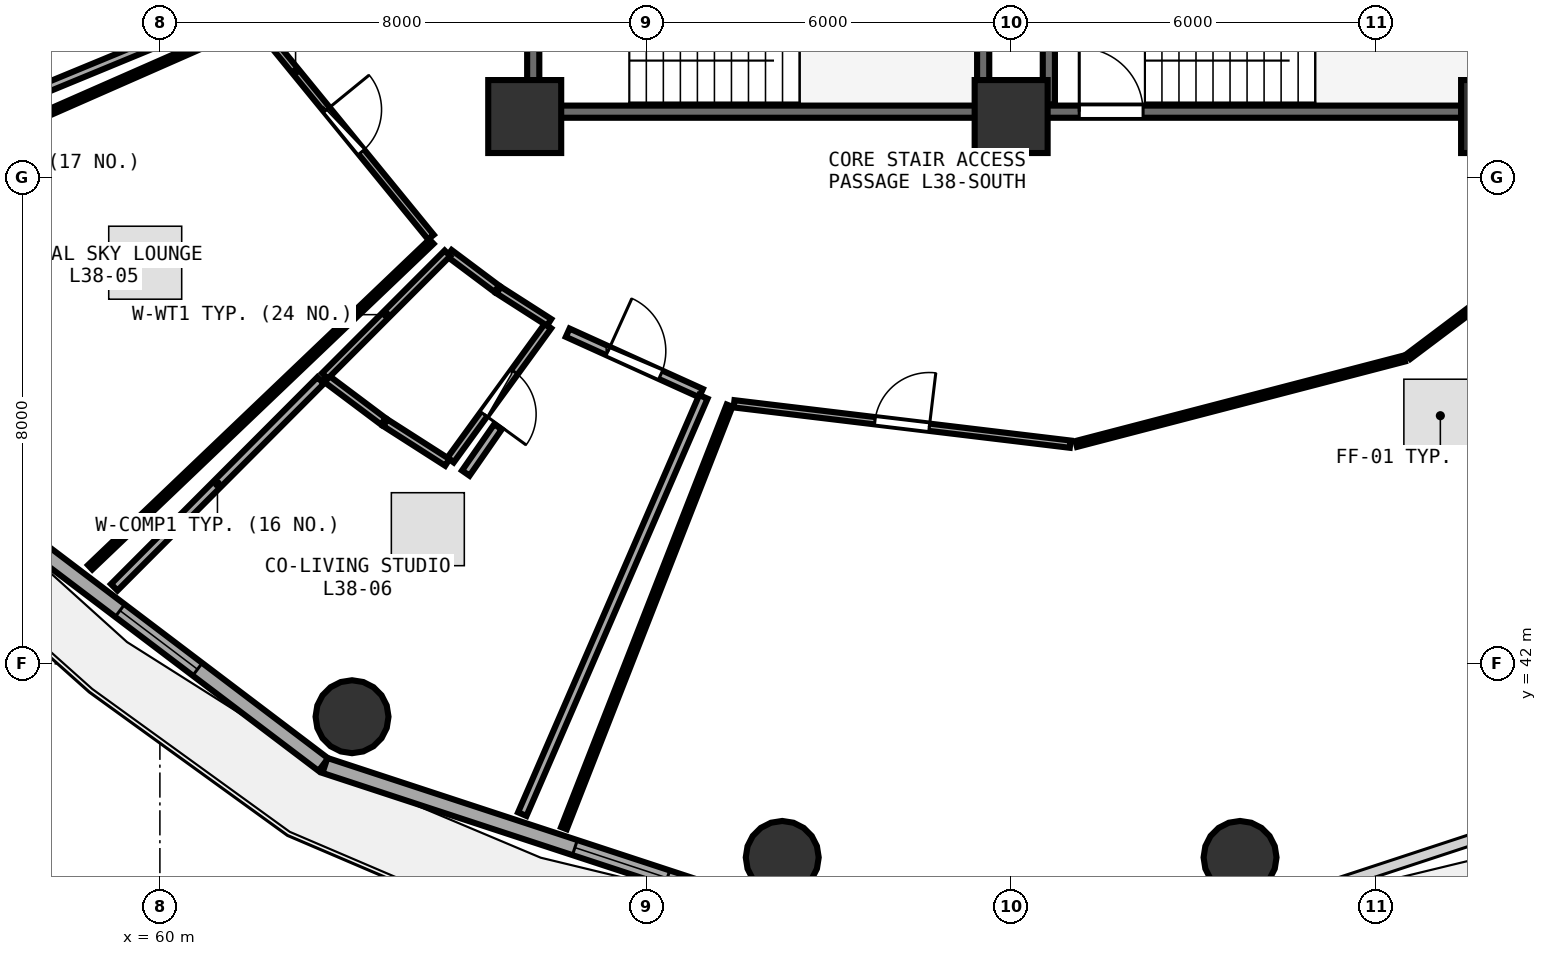
"""IFC4 building model, lengths in metres.
Left out: names, types, materials, properties, quantities, classifications, styles, units other than length and angle.
Written with IfcOpenShell. Run it as: python <this file> out.ifc"""

import sys

from ifc_helpers import new_model, si_unit, direction, frame, frame_2d, origin, origin_2d, place, context, subcontext, project, spatial, rectangle, circle, extrude, element, fill, save


model = new_model("IFC4")
c1 = context("Model", 3, precision=1e-05, world=origin(), true_north=direction((0.0, 1.0)))
c2 = subcontext(c1, "Body", "Model", "MODEL_VIEW")
j1 = project(units=[si_unit("LENGTHUNIT", "METRE"), si_unit("PLANEANGLEUNIT", "RADIAN")], contexts=[c1])
p1 = place(None, origin())
s1 = spatial("IfcSite", under=j1, at=p1, CompositionType="ELEMENT")
p2 = place(p1, origin())
s2 = spatial("IfcBuilding", under=s1, at=p2, CompositionType="ELEMENT")
p3 = place(p2, frame((0.0, 0.0, 150.6)))
s3 = spatial("IfcBuildingStorey", under=s2, at=p3, CompositionType="ELEMENT", Elevation=150.6)
for number, where, z_axis, x_axis in (
    (1, (66.0, 51.0, 0.0), (0.0, 0.0, 1.0), (1.0, 0.0, 0.0)),
    (2, (74.0, 51.0, 0.0), (0.0, 0.0, 1.0), (1.0, 0.0, 0.0)),
    (3, (82.0, 51.0, 0.0), (0.0, 0.0, 1.0), (1.0, 0.0, 0.0)),
):
    element("IfcColumn", number, at=place(p3, frame(where, z_axis=z_axis, x_axis=x_axis)), inside=s3, PredefinedType="PILASTER", context=c2, shape_type="SweptSolid", body=[
        extrude(rectangle(XDim=1.2, YDim=1.2, at=origin_2d()), origin(), (0.0, 0.0, 1.0), 3.75),
    ])
for number, where, z_axis, x_axis in (
    (4, (63.16, 41.13, 0.0), (0.0, 0.0, 1.0), (1.0, 0.0, 0.0)),
    (5, (70.235, 38.816, 0.0), (0.0, 0.0, 1.0), (1.0, 0.0, 0.0)),
    (6, (77.765, 38.816, 0.0), (0.0, 0.0, 1.0), (1.0, 0.0, 0.0)),
):
    element("IfcColumn", number, at=place(p3, frame(where, z_axis=z_axis, x_axis=x_axis)), inside=s3, PredefinedType="COLUMN", context=c2, shape_type="SweptSolid", body=[
        extrude(circle(Radius=0.6, at=origin_2d()), origin(), (0.0, 0.0, 1.0), 3.75),
    ])
p4 = place(p3, frame((56.699, 44.878, 0.0), z_axis=(0.0, 0.0, 1.0), x_axis=(0.797163719609, -0.603763202042, 0.0)))
e7 = element("IfcWall", 7, at=p4, inside=s3, PredefinedType="SOLIDWALL", context=c2, shape_type="SweptSolid", body=[
    extrude(rectangle(XDim=7.512, YDim=0.26, at=frame_2d((3.756, 0.0))), origin(), (0.0, 0.0, 1.0), 3.475),
])
p5 = place(p4, frame((3.316, 0.0, 0.85)))
e8 = element("IfcOpeningElement", 8, at=p5, cuts=e7, PredefinedType="OPENING", context=c2, shape_type="SweptSolid", body=[
    extrude(rectangle(XDim=1.6, YDim=1.45, at=frame_2d((0.8, 0.725))), frame((0.0, 0.14, 0.0), z_axis=(0.0, -1.0, 0.0), x_axis=(1.0, 0.0, 0.0)), (0.0, 0.0, 1.0), 0.28),
])
p6 = place(p3, frame((62.714, 40.328, 0.0), z_axis=(0.0, 0.0, 1.0), x_axis=(0.950038302428, -0.312133343173, 0.0)))
e9 = element("IfcWall", 9, at=p6, inside=s3, PredefinedType="SOLIDWALL", context=c2, shape_type="SweptSolid", body=[
    extrude(rectangle(XDim=7.733, YDim=0.26, at=frame_2d((3.867, 0.0))), origin(), (0.0, 0.0, 1.0), 3.475),
])
p7 = place(p6, frame((4.327, 0.0, 0.85)))
e10 = element("IfcOpeningElement", 10, at=p7, cuts=e9, PredefinedType="OPENING", context=c2, shape_type="SweptSolid", body=[
    extrude(rectangle(XDim=1.6, YDim=1.45, at=frame_2d((0.8, 0.725))), frame((0.0, 0.14, 0.0), z_axis=(0.0, -1.0, 0.0), x_axis=(1.0, 0.0, 0.0)), (0.0, 0.0, 1.0), 0.28),
])
p8 = place(p3, frame((74.0, 51.08, 0.0), z_axis=(0.0, 0.0, 1.0), x_axis=(1.0, 0.0, 0.0)))
e11 = element("IfcWall", 11, at=p8, inside=s3, PredefinedType="SHEAR", context=c2, shape_type="SweptSolid", body=[
    extrude(rectangle(XDim=7.9, YDim=0.2, at=frame_2d((3.95, 0.0))), origin(), (0.0, 0.0, 1.0), 3.49),
])
p9 = place(p8, frame((1.12, 0.0, 0.0)))
e12 = element("IfcOpeningElement", 12, at=p9, cuts=e11, PredefinedType="OPENING", context=c2, shape_type="SweptSolid", body=[
    extrude(rectangle(XDim=1.05, YDim=2.1, at=frame_2d((0.525, 1.05))), frame((0.0, 0.11, 0.0), z_axis=(0.0, -1.0, 0.0), x_axis=(1.0, 0.0, 0.0)), (0.0, 0.0, 1.0), 0.22),
])
p10 = place(p3, frame((74.62, 54.27, 0.0), z_axis=(0.0, 0.0, 1.0), x_axis=(0.0, -1.0, 0.0)))
e13 = element("IfcWall", 13, at=p10, inside=s3, PredefinedType="SHEAR", context=c2, shape_type="SweptSolid", body=[
    extrude(rectangle(XDim=3.07, YDim=0.2, at=frame_2d((1.535, 0.0))), origin(), (0.0, 0.0, 1.0), 3.49),
])
p11 = place(p3, frame((66.26, 51.08, 0.0), z_axis=(0.0, 0.0, 1.0), x_axis=(1.0, 0.0, 0.0)))
e14 = element("IfcWall", 14, at=p11, inside=s3, PredefinedType="SHEAR", context=c2, shape_type="SweptSolid", body=[
    extrude(rectangle(XDim=7.16, YDim=0.2, at=frame_2d((3.58, 0.0))), origin(), (0.0, 0.0, 1.0), 3.49),
])
p12 = place(p3, frame((73.54, 51.2, 0.0), z_axis=(0.0, 0.0, 1.0), x_axis=(0.0, 1.0, 0.0)))
e15 = element("IfcWall", 15, at=p12, inside=s3, PredefinedType="SHEAR", context=c2, shape_type="SweptSolid", body=[
    extrude(rectangle(XDim=3.07, YDim=0.2, at=frame_2d((1.535, 0.0))), origin(), (0.0, 0.0, 1.0), 3.49),
])
p13 = place(p3, frame((66.14, 54.27, 0.0), z_axis=(0.0, 0.0, 1.0), x_axis=(0.0, -1.0, 0.0)))
e16 = element("IfcWall", 16, at=p13, inside=s3, PredefinedType="SHEAR", context=c2, shape_type="SweptSolid", body=[
    extrude(rectangle(XDim=3.07, YDim=0.2, at=frame_2d((1.535, 0.0))), origin(), (0.0, 0.0, 1.0), 3.49),
])
p14 = place(p13, frame((1.01, 0.0, 0.0)))
e17 = element("IfcOpeningElement", 17, at=p14, cuts=e16, PredefinedType="OPENING", context=c2, shape_type="SweptSolid", body=[
    extrude(rectangle(XDim=1.05, YDim=2.1, at=frame_2d((0.525, 1.05))), frame((0.0, 0.11, 0.0), z_axis=(0.0, -1.0, 0.0), x_axis=(1.0, 0.0, 0.0)), (0.0, 0.0, 1.0), 0.22),
])
p15 = place(p3, frame((69.443, 46.276, 0.0), z_axis=(0.0, 0.0, 1.0), x_axis=(0.992874348748, -0.119165966612, 0.0)))
e18 = element("IfcWall", 18, at=p15, inside=s3, PredefinedType="PARTITIONING", context=c2, shape_type="SweptSolid", body=[
    extrude(rectangle(XDim=5.569, YDim=0.12, at=frame_2d((2.784, 0.0))), origin(), (0.0, 0.0, 1.0), 2.975),
])
p16 = place(p15, frame((2.334, 0.0, 0.0)))
e19 = element("IfcOpeningElement", 19, at=p16, cuts=e18, PredefinedType="OPENING", context=c2, shape_type="SweptSolid", body=[
    extrude(rectangle(XDim=0.9, YDim=2.08, at=frame_2d((0.45, 1.04))), frame((0.0, 0.07, 0.0), z_axis=(0.0, -1.0, 0.0), x_axis=(1.0, 0.0, 0.0)), (0.0, 0.0, 1.0), 0.14),
])
p17 = place(p3, frame((61.604, 52.511, 0.0), z_axis=(0.0, 0.0, 1.0), x_axis=(0.632491819148, -0.77456703952, 0.0)))
e20 = element("IfcWall", 20, at=p17, inside=s3, PredefinedType="PARTITIONING", context=c2, shape_type="SweptSolid", body=[
    extrude(rectangle(XDim=4.511, YDim=0.12, at=frame_2d((2.255, 0.0))), origin(), (0.0, 0.0, 1.0), 2.975),
])
p18 = place(p17, frame((1.805, 0.0, 0.0)))
e21 = element("IfcOpeningElement", 21, at=p18, cuts=e20, PredefinedType="OPENING", context=c2, shape_type="SweptSolid", body=[
    extrude(rectangle(XDim=0.9, YDim=2.08, at=frame_2d((0.45, 1.04))), frame((0.0, 0.07, 0.0), z_axis=(0.0, -1.0, 0.0), x_axis=(1.0, 0.0, 0.0)), (0.0, 0.0, 1.0), 0.14),
])
p19 = place(p3, frame((66.383, 47.555, 0.0), z_axis=(0.0, 0.0, 1.0), x_axis=(-0.588001344837, -0.808859949849, 0.0)))
e22 = element("IfcWall", 22, at=p19, inside=s3, PredefinedType="PLUMBINGWALL", context=c2, shape_type="SweptSolid", body=[
    extrude(rectangle(XDim=2.727, YDim=0.13, at=frame_2d((1.364, 0.0))), origin(), (0.0, 0.0, 1.0), 3.235),
])
p20 = place(p19, frame((0.934, 0.0, 0.0)))
e23 = element("IfcOpeningElement", 23, at=p20, cuts=e22, PredefinedType="OPENING", context=c2, shape_type="SweptSolid", body=[
    extrude(rectangle(XDim=0.86, YDim=2.05, at=frame_2d((0.43, 1.025))), frame((0.0, 0.075, 0.0), z_axis=(0.0, -1.0, 0.0), x_axis=(1.0, 0.0, 0.0)), (0.0, 0.0, 1.0), 0.15),
])
p21 = place(p3, frame((66.707, 47.445, 0.0), z_axis=(0.0, 0.0, 1.0), x_axis=(0.910872904928, -0.412686989216, 0.0)))
e24 = element("IfcWall", 24, at=p21, inside=s3, PredefinedType="PARTITIONING", context=c2, shape_type="SweptSolid", body=[
    extrude(rectangle(XDim=2.407, YDim=0.15, at=frame_2d((1.204, 0.0))), origin(), (0.0, 0.0, 1.0), 3.235),
])
p22 = place(p21, frame((0.729, 0.0, 0.0)))
e25 = element("IfcOpeningElement", 25, at=p22, cuts=e24, PredefinedType="OPENING", context=c2, shape_type="SweptSolid", body=[
    extrude(rectangle(XDim=0.95, YDim=2.08, at=frame_2d((0.475, 1.04))), frame((0.0, 0.085, 0.0), z_axis=(0.0, -1.0, 0.0), x_axis=(1.0, 0.0, 0.0)), (0.0, 0.0, 1.0), 0.17),
])
p23 = place(p3, frame((75.07, 45.615, 0.0), z_axis=(0.0, 0.0, 1.0), x_axis=(0.967718115259, 0.252035016216, 0.0)))
e26 = element("IfcWall", 26, at=p23, inside=s3, PredefinedType="PARTITIONING", context=c2, shape_type="SweptSolid", body=[
    extrude(rectangle(XDim=5.575, YDim=0.1, at=frame_2d((2.787, 0.0))), origin(), (0.0, 0.0, 1.0), 2.975),
])
p24 = place(p3, frame((80.535, 47.054, 0.0), z_axis=(0.0, 0.0, 1.0), x_axis=(0.799096406603, 0.601202904979, 0.0)))
e27 = element("IfcWall", 27, at=p24, inside=s3, PredefinedType="PARTITIONING", context=c2, shape_type="SweptSolid", body=[
    extrude(rectangle(XDim=5.387, YDim=0.1, at=frame_2d((2.694, 0.0))), origin(), (0.0, 0.0, 1.0), 2.975),
])
p25 = place(p3, frame((66.645, 39.297, 0.0), z_axis=(0.0, 0.0, 1.0), x_axis=(0.364957999702, 0.931023983823, 0.0)))
e28 = element("IfcWall", 28, at=p25, inside=s3, PredefinedType="PARTITIONING", context=c2, shape_type="SweptSolid", body=[
    extrude(rectangle(XDim=7.464, YDim=0.1, at=frame_2d((3.732, 0.0))), origin(), (0.0, 0.0, 1.0), 3.025),
])
p26 = place(p3, frame((61.385, 52.817, 0.0), z_axis=(0.0, 0.0, 1.0), x_axis=(-0.924352507704, -0.381539567412, 0.0)))
e29 = element("IfcWall", 29, at=p26, inside=s3, PredefinedType="PARTITIONING", context=c2, shape_type="SweptSolid", body=[
    extrude(rectangle(XDim=8.037, YDim=0.15, at=frame_2d((4.019, 0.0))), origin(), (0.0, 0.0, 1.0), 2.975),
])
p27 = place(p3, frame((64.466, 48.943, 0.0), z_axis=(0.0, 0.0, 1.0), x_axis=(-0.723511266615, -0.690312572014, 0.0)))
e30 = element("IfcWall", 30, at=p27, inside=s3, PredefinedType="PARTITIONING", context=c2, shape_type="SweptSolid", body=[
    extrude(rectangle(XDim=7.758, YDim=0.1, at=frame_2d((3.879, 0.0))), origin(), (0.0, 0.0, 1.0), 3.025),
])
p28 = place(p3, frame((54.186, 49.312, 0.0), z_axis=(0.0, 0.0, 1.0), x_axis=(0.915373356269, 0.402606034024, 0.0)))
e31 = element("IfcWall", 31, at=p28, inside=s3, PredefinedType="PARTITIONING", context=c2, shape_type="SweptSolid", body=[
    extrude(rectangle(XDim=8.023, YDim=0.1, at=frame_2d((4.011, 0.0))), origin(), (0.0, 0.0, 1.0), 2.975),
])
p29 = place(p3, frame((64.759, 48.753, 0.0), z_axis=(0.0, 0.0, 1.0), x_axis=(0.800390142897, -0.599479456824, 0.0)))
e32 = element("IfcWall", 32, at=p29, inside=s3, PredefinedType="PLUMBINGWALL", context=c2, shape_type="SweptSolid", body=[
    extrude(rectangle(XDim=0.976, YDim=0.13, at=frame_2d((0.488, 0.0))), origin(), (0.0, 0.0, 1.0), 2.975),
])
p30 = place(p3, frame((65.573, 48.145, 0.0), z_axis=(0.0, 0.0, 1.0), x_axis=(0.842104586495, -0.539314254776, 0.0)))
e33 = element("IfcWall", 33, at=p30, inside=s3, PredefinedType="PLUMBINGWALL", context=c2, shape_type="SweptSolid", body=[
    extrude(rectangle(XDim=0.984, YDim=0.13, at=frame_2d((0.492, 0.0))), origin(), (0.0, 0.0, 1.0), 3.48),
])
p31 = place(p3, frame((64.727, 45.312, 0.0), z_axis=(0.0, 0.0, 1.0), x_axis=(-0.842330007588, 0.538962112135, 0.0)))
e34 = element("IfcWall", 34, at=p31, inside=s3, PredefinedType="PLUMBINGWALL", context=c2, shape_type="SweptSolid", body=[
    extrude(rectangle(XDim=1.21, YDim=0.13, at=frame_2d((0.605, 0.0))), origin(), (0.0, 0.0, 1.0), 2.975),
])
p32 = place(p3, frame((63.675, 45.987, 0.0), z_axis=(0.0, 0.0, 1.0), x_axis=(-0.8, 0.6, 0.0)))
e35 = element("IfcWall", 35, at=p32, inside=s3, PredefinedType="PLUMBINGWALL", context=c2, shape_type="SweptSolid", body=[
    extrude(rectangle(XDim=1.2, YDim=0.13, at=frame_2d((0.6, 0.0))), origin(), (0.0, 0.0, 1.0), 3.48),
])
p33 = place(p3, frame((62.713, 46.733, 0.0), z_axis=(0.0, 0.0, 1.0), x_axis=(0.706764315195, 0.707449081396, 0.0)))
e36 = element("IfcWall", 36, at=p33, inside=s3, PredefinedType="PLUMBINGWALL", context=c2, shape_type="SweptSolid", body=[
    extrude(rectangle(XDim=2.852, YDim=0.13, at=frame_2d((1.426, 0.0))), origin(), (0.0, 0.0, 1.0), 3.235),
])
p34 = place(p3, frame((68.938, 46.39, 0.0), z_axis=(0.0, 0.0, 1.0), x_axis=(-0.398074464123, -0.917353105959, 0.0)))
e37 = element("IfcWall", 37, at=p34, inside=s3, PredefinedType="PARTITIONING", context=c2, shape_type="SweptSolid", body=[
    extrude(rectangle(XDim=7.481, YDim=0.15, at=frame_2d((3.741, 0.0))), origin(), (0.0, 0.0, 1.0), 3.025),
])
p35 = place(p3, frame((59.249, 43.258, 0.0), z_axis=(0.0, 0.0, 1.0), x_axis=(0.706293548202, 0.707919079958, 0.0)))
e38 = element("IfcWall", 38, at=p35, inside=s3, PredefinedType="PARTITIONING", context=c2, shape_type="SweptSolid", body=[
    extrude(rectangle(XDim=4.806, YDim=0.15, at=frame_2d((2.403, 0.0))), origin(), (0.0, 0.0, 1.0), 3.025),
])
p36 = place(p3, frame((65.031, 45.136, 0.0), z_axis=(0.0, 0.0, 1.0), x_axis=(0.570563407037, 0.821253553143, 0.0)))
e39 = element("IfcWall", 39, at=p36, inside=s3, PredefinedType="PARTITIONING", context=c2, shape_type="SweptSolid", body=[
    extrude(rectangle(XDim=0.928, YDim=0.15, at=frame_2d((0.464, 0.0))), origin(), (0.0, 0.0, 1.0), 3.48),
])
p37 = place(p5, origin())
e40 = element("IfcWindow", 40, at=p37, inside=s3, PartitioningType="SINGLE_PANEL", PredefinedType="WINDOW", context=c2, shape_type="SweptSolid", body=[
    extrude(rectangle(XDim=1.6, YDim=1.45, at=frame_2d((0.8, 0.725))), frame((0.0, 0.03, 0.0), z_axis=(0.0, -1.0, 0.0), x_axis=(1.0, 0.0, 0.0)), (0.0, 0.0, 1.0), 0.06),
])
fill(e8, e40)
p38 = place(p7, origin())
e41 = element("IfcWindow", 41, at=p38, inside=s3, PartitioningType="SINGLE_PANEL", PredefinedType="WINDOW", context=c2, shape_type="SweptSolid", body=[
    extrude(rectangle(XDim=1.6, YDim=1.45, at=frame_2d((0.8, 0.725))), frame((0.0, 0.03, 0.0), z_axis=(0.0, -1.0, 0.0), x_axis=(1.0, 0.0, 0.0)), (0.0, 0.0, 1.0), 0.06),
])
fill(e10, e41)
p39 = place(p9, origin())
e42 = element("IfcDoor", 42, at=p39, inside=s3, OperationType="SINGLE_SWING_LEFT", PredefinedType="DOOR", context=c2, shape_type="SweptSolid", body=[
    extrude(rectangle(XDim=1.05, YDim=2.1, at=frame_2d((0.525, 1.05))), frame((0.0, 0.025, 0.0), z_axis=(0.0, -1.0, 0.0), x_axis=(1.0, 0.0, 0.0)), (0.0, 0.0, 1.0), 0.05),
])
fill(e12, e42)
p40 = place(p16, origin())
e43 = element("IfcDoor", 43, at=p40, inside=s3, OperationType="SINGLE_SWING_RIGHT", PredefinedType="DOOR", context=c2, shape_type="SweptSolid", body=[
    extrude(rectangle(XDim=0.9, YDim=2.08, at=frame_2d((0.45, 1.04))), frame((0.0, 0.025, 0.0), z_axis=(0.0, -1.0, 0.0), x_axis=(1.0, 0.0, 0.0)), (0.0, 0.0, 1.0), 0.05),
])
fill(e19, e43)
p41 = place(p18, origin())
e44 = element("IfcDoor", 44, at=p41, inside=s3, OperationType="SINGLE_SWING_LEFT", PredefinedType="DOOR", context=c2, shape_type="SweptSolid", body=[
    extrude(rectangle(XDim=0.9, YDim=2.08, at=frame_2d((0.45, 1.04))), frame((0.0, 0.025, 0.0), z_axis=(0.0, -1.0, 0.0), x_axis=(1.0, 0.0, 0.0)), (0.0, 0.0, 1.0), 0.05),
])
fill(e21, e44)
p42 = place(p20, origin())
e45 = element("IfcDoor", 45, at=p42, inside=s3, OperationType="SINGLE_SWING_RIGHT", PredefinedType="DOOR", context=c2, shape_type="SweptSolid", body=[
    extrude(rectangle(XDim=0.86, YDim=2.05, at=frame_2d((0.43, 1.025))), frame((0.0, 0.025, 0.0), z_axis=(0.0, -1.0, 0.0), x_axis=(1.0, 0.0, 0.0)), (0.0, 0.0, 1.0), 0.05),
])
fill(e23, e45)
p43 = place(p22, origin())
e46 = element("IfcDoor", 46, at=p43, inside=s3, OperationType="SINGLE_SWING_LEFT", PredefinedType="DOOR", context=c2, shape_type="SweptSolid", body=[
    extrude(rectangle(XDim=0.95, YDim=2.08, at=frame_2d((0.475, 1.04))), frame((0.0, 0.025, 0.0), z_axis=(0.0, -1.0, 0.0), x_axis=(1.0, 0.0, 0.0)), (0.0, 0.0, 1.0), 0.05),
])
fill(e25, e46)
save(model, sys.argv[1])
